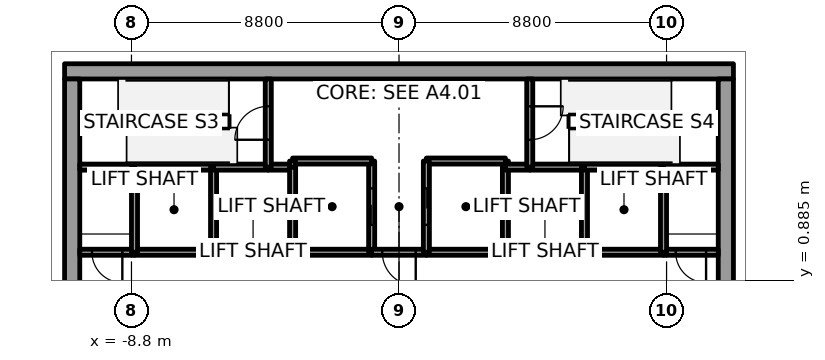
"""IFC4 building model, lengths in metres.
Left out: names, types, materials, properties, quantities, classifications, styles, units other than length and angle.
Written with IfcOpenShell. Run it as: python <this file> out.ifc"""

import sys

from ifc_helpers import new_model, si_unit, direction, frame, frame_2d, origin, place, context, subcontext, project, spatial, rectangle, extrude, element, fill, save


model = new_model("IFC4")
c1 = context("Model", 3, precision=1e-05, world=origin(), true_north=direction((0.0, 1.0)))
c2 = subcontext(c1, "Body", "Model", "MODEL_VIEW")
j1 = project(units=[si_unit("LENGTHUNIT", "METRE"), si_unit("PLANEANGLEUNIT", "RADIAN")], contexts=[c1])
p1 = place(None, origin())
s1 = spatial("IfcSite", under=j1, at=p1, CompositionType="ELEMENT")
p2 = place(p1, origin())
s2 = spatial("IfcBuilding", under=s1, at=p2, CompositionType="ELEMENT")
p3 = place(p2, frame((0.0, 0.0, -4.5)))
s3 = spatial("IfcBuildingStorey", under=s2, at=p3, CompositionType="ELEMENT", Elevation=-4.5)
p4 = place(p3, frame((-11.0, 7.75, 0.0), z_axis=(0.0, 0.0, 1.0), x_axis=(1.0, 0.0, 0.0)))
e1 = element("IfcWall", 1, at=p4, inside=s3, PredefinedType="SHEAR", context=c2, shape_type="SweptSolid", body=[
    extrude(rectangle(XDim=22.0, YDim=0.5, at=frame_2d((11.0, 0.0))), origin(), (0.0, 0.0, 1.0), 4.5),
])
for number, where, z_axis, x_axis in (
    (2, (-10.75, -7.5, 0.0), (0.0, 0.0, 1.0), (0.0, 1.0, 0.0)),
    (3, (10.75, -7.5, 0.0), (0.0, 0.0, 1.0), (0.0, 1.0, 0.0)),
):
    element("IfcWall", number, at=place(p3, frame(where, z_axis=z_axis, x_axis=x_axis)), inside=s3, PredefinedType="SHEAR", context=c2, shape_type="SweptSolid", body=[
        extrude(rectangle(XDim=15.0, YDim=0.5, at=frame_2d((7.5, 0.0))), origin(), (0.0, 0.0, 1.0), 4.5),
    ])
p5 = place(p3, frame((-8.7, 1.8, 0.0), z_axis=(0.0, 0.0, 1.0), x_axis=(-1.0, 0.0, 0.0)))
e4 = element("IfcWall", 4, at=p5, inside=s3, PredefinedType="SOLIDWALL", context=c2, shape_type="SweptSolid", body=[
    extrude(rectangle(XDim=1.8, YDim=0.2, at=frame_2d((0.9, 0.0))), origin(), (0.0, 0.0, 1.0), 4.25),
])
p6 = place(p5, frame((0.4, 0.0, 0.0)))
e5 = element("IfcOpeningElement", 5, at=p6, cuts=e4, PredefinedType="OPENING", context=c2, shape_type="SweptSolid", body=[
    extrude(rectangle(XDim=1.0, YDim=2.4, at=frame_2d((0.5, 1.2))), frame((0.0, 0.1, 0.0), z_axis=(0.0, -1.0, 0.0), x_axis=(1.0, 0.0, 0.0)), (0.0, 0.0, 1.0), 0.2),
])
p7 = place(p3, frame((-8.7, 4.6, 0.0), z_axis=(0.0, 0.0, 1.0), x_axis=(-1.0, 0.0, 0.0)))
e6 = element("IfcWall", 6, at=p7, inside=s3, PredefinedType="SOLIDWALL", context=c2, shape_type="SweptSolid", body=[
    extrude(rectangle(XDim=1.8, YDim=0.2, at=frame_2d((0.9, 0.0))), origin(), (0.0, 0.0, 1.0), 4.25),
])
p8 = place(p3, frame((-6.1, 1.8, 0.0), z_axis=(0.0, 0.0, 1.0), x_axis=(-1.0, 0.0, 0.0)))
e7 = element("IfcWall", 7, at=p8, inside=s3, PredefinedType="SOLIDWALL", context=c2, shape_type="SweptSolid", body=[
    extrude(rectangle(XDim=2.6, YDim=0.2, at=frame_2d((1.3, 0.0))), origin(), (0.0, 0.0, 1.0), 4.25),
])
p9 = place(p3, frame((-8.7, 1.8, 0.0), z_axis=(0.0, 0.0, 1.0), x_axis=(0.0, 1.0, 0.0)))
e8 = element("IfcWall", 8, at=p9, inside=s3, PredefinedType="SOLIDWALL", context=c2, shape_type="SweptSolid", body=[
    extrude(rectangle(XDim=2.8, YDim=0.2, at=frame_2d((1.4, 0.0))), origin(), (0.0, 0.0, 1.0), 4.25),
])
p10 = place(p3, frame((-6.1, 4.6, 0.0), z_axis=(0.0, 0.0, 1.0), x_axis=(-1.0, 0.0, 0.0)))
e9 = element("IfcWall", 9, at=p10, inside=s3, PredefinedType="SOLIDWALL", context=c2, shape_type="SweptSolid", body=[
    extrude(rectangle(XDim=2.6, YDim=0.2, at=frame_2d((1.3, 0.0))), origin(), (0.0, 0.0, 1.0), 4.25),
])
p11 = place(p3, frame((-3.5, 1.8, 0.0), z_axis=(0.0, 0.0, 1.0), x_axis=(-1.0, 0.0, 0.0)))
e10 = element("IfcWall", 10, at=p11, inside=s3, PredefinedType="SOLIDWALL", context=c2, shape_type="SweptSolid", body=[
    extrude(rectangle(XDim=2.6, YDim=0.2, at=frame_2d((1.3, 0.0))), origin(), (0.0, 0.0, 1.0), 4.25),
])
p12 = place(p3, frame((-6.1, 1.8, 0.0), z_axis=(0.0, 0.0, 1.0), x_axis=(0.0, 1.0, 0.0)))
e11 = element("IfcWall", 11, at=p12, inside=s3, PredefinedType="SOLIDWALL", context=c2, shape_type="SweptSolid", body=[
    extrude(rectangle(XDim=2.8, YDim=0.2, at=frame_2d((1.4, 0.0))), origin(), (0.0, 0.0, 1.0), 4.25),
])
p13 = place(p3, frame((-4.3, 4.6, 0.0), z_axis=(0.0, 0.0, 1.0), x_axis=(-1.0, 0.0, 0.0)))
e12 = element("IfcWall", 12, at=p13, inside=s3, PredefinedType="SOLIDWALL", context=c2, shape_type="SweptSolid", body=[
    extrude(rectangle(XDim=1.8, YDim=0.2, at=frame_2d((0.9, 0.0))), origin(), (0.0, 0.0, 1.0), 4.25),
])
p14 = place(p3, frame((-3.5, 4.6, 0.0), z_axis=(0.0, 0.0, 1.0), x_axis=(-1.0, 0.0, 0.0)))
e13 = element("IfcWall", 13, at=p14, inside=s3, PredefinedType="SOLIDWALL", context=c2, shape_type="SweptSolid", body=[
    extrude(rectangle(XDim=0.8, YDim=0.2, at=frame_2d((0.4, 0.0))), origin(), (0.0, 0.0, 1.0), 4.25),
])
p15 = place(p3, frame((-4.3, 4.6, 0.0), z_axis=(0.0, 0.0, 1.0), x_axis=(0.0, 1.0, 0.0)))
e14 = element("IfcWall", 14, at=p15, inside=s3, PredefinedType="SOLIDWALL", context=c2, shape_type="SweptSolid", body=[
    extrude(rectangle(XDim=2.9, YDim=0.2, at=frame_2d((1.45, 0.0))), origin(), (0.0, 0.0, 1.0), 4.25),
])
p16 = place(p15, frame((0.9, 0.0, 0.0)))
e15 = element("IfcOpeningElement", 15, at=p16, cuts=e14, PredefinedType="OPENING", context=c2, shape_type="SweptSolid", body=[
    extrude(rectangle(XDim=1.1, YDim=2.4, at=frame_2d((0.55, 1.2))), frame((0.0, 0.1, 0.0), z_axis=(0.0, -1.0, 0.0), x_axis=(1.0, 0.0, 0.0)), (0.0, 0.0, 1.0), 0.2),
])
p17 = place(p3, frame((-0.9, 1.8, 0.0), z_axis=(0.0, 0.0, 1.0), x_axis=(-1.0, 0.0, 0.0)))
e16 = element("IfcWall", 16, at=p17, inside=s3, PredefinedType="SOLIDWALL", context=c2, shape_type="SweptSolid", body=[
    extrude(rectangle(XDim=2.6, YDim=0.2, at=frame_2d((1.3, 0.0))), origin(), (0.0, 0.0, 1.0), 4.25),
])
p18 = place(p3, frame((-3.5, 4.6, 0.0), z_axis=(0.0, 0.0, 1.0), x_axis=(0.0, -1.0, 0.0)))
e17 = element("IfcWall", 17, at=p18, inside=s3, PredefinedType="SOLIDWALL", context=c2, shape_type="SweptSolid", body=[
    extrude(rectangle(XDim=2.8, YDim=0.2, at=frame_2d((1.4, 0.0))), origin(), (0.0, 0.0, 1.0), 4.25),
])
p19 = place(p3, frame((-0.9, 1.8, 0.0), z_axis=(0.0, 0.0, 1.0), x_axis=(0.0, 1.0, 0.0)))
e18 = element("IfcWall", 18, at=p19, inside=s3, PredefinedType="SOLIDWALL", context=c2, shape_type="SweptSolid", body=[
    extrude(rectangle(XDim=3.0, YDim=0.2, at=frame_2d((1.5, 0.0))), origin(), (0.0, 0.0, 1.0), 4.25),
])
p20 = place(p19, frame((0.9, 0.0, 0.0)))
e19 = element("IfcOpeningElement", 19, at=p20, cuts=e18, PredefinedType="OPENING", context=c2, shape_type="SweptSolid", body=[
    extrude(rectangle(XDim=1.2, YDim=2.1, at=frame_2d((0.6, 1.05))), frame((0.0, 0.1, 0.0), z_axis=(0.0, -1.0, 0.0), x_axis=(1.0, 0.0, 0.0)), (0.0, 0.0, 1.0), 0.2),
])
p21 = place(p3, frame((-0.9, 4.8, 0.0), z_axis=(0.0, 0.0, 1.0), x_axis=(-1.0, 0.0, 0.0)))
e20 = element("IfcWall", 20, at=p21, inside=s3, PredefinedType="SOLIDWALL", context=c2, shape_type="SweptSolid", body=[
    extrude(rectangle(XDim=2.6, YDim=0.2, at=frame_2d((1.3, 0.0))), origin(), (0.0, 0.0, 1.0), 4.25),
])
p22 = place(p3, frame((-3.5, 4.8, 0.0), z_axis=(0.0, 0.0, 1.0), x_axis=(0.0, -1.0, 0.0)))
e21 = element("IfcWall", 21, at=p22, inside=s3, PredefinedType="SOLIDWALL", context=c2, shape_type="SweptSolid", body=[
    extrude(rectangle(XDim=0.2, YDim=0.2, at=frame_2d((0.1, 0.0))), origin(), (0.0, 0.0, 1.0), 4.25),
])
p23 = place(p3, frame((0.9, 1.8, 0.0), z_axis=(0.0, 0.0, 1.0), x_axis=(-1.0, 0.0, 0.0)))
e22 = element("IfcWall", 22, at=p23, inside=s3, PredefinedType="SOLIDWALL", context=c2, shape_type="SweptSolid", body=[
    extrude(rectangle(XDim=1.8, YDim=0.2, at=frame_2d((0.9, 0.0))), origin(), (0.0, 0.0, 1.0), 4.25),
])
p24 = place(p23, frame((0.35, 0.0, 0.0)))
e23 = element("IfcOpeningElement", 23, at=p24, cuts=e22, PredefinedType="OPENING", context=c2, shape_type="SweptSolid", body=[
    extrude(rectangle(XDim=1.1, YDim=2.4, at=frame_2d((0.55, 1.2))), frame((0.0, 0.1, 0.0), z_axis=(0.0, -1.0, 0.0), x_axis=(1.0, 0.0, 0.0)), (0.0, 0.0, 1.0), 0.2),
])
p25 = place(p3, frame((3.5, 1.8, 0.0), z_axis=(0.0, 0.0, 1.0), x_axis=(-1.0, 0.0, 0.0)))
e24 = element("IfcWall", 24, at=p25, inside=s3, PredefinedType="SOLIDWALL", context=c2, shape_type="SweptSolid", body=[
    extrude(rectangle(XDim=2.6, YDim=0.2, at=frame_2d((1.3, 0.0))), origin(), (0.0, 0.0, 1.0), 4.25),
])
p26 = place(p3, frame((3.5, 4.6, 0.0), z_axis=(0.0, 0.0, 1.0), x_axis=(0.0, 1.0, 0.0)))
e25 = element("IfcWall", 25, at=p26, inside=s3, PredefinedType="SOLIDWALL", context=c2, shape_type="SweptSolid", body=[
    extrude(rectangle(XDim=0.2, YDim=0.2, at=frame_2d((0.1, 0.0))), origin(), (0.0, 0.0, 1.0), 4.25),
])
p27 = place(p3, frame((3.5, 4.8, 0.0), z_axis=(0.0, 0.0, 1.0), x_axis=(-1.0, 0.0, 0.0)))
e26 = element("IfcWall", 26, at=p27, inside=s3, PredefinedType="SOLIDWALL", context=c2, shape_type="SweptSolid", body=[
    extrude(rectangle(XDim=2.6, YDim=0.2, at=frame_2d((1.3, 0.0))), origin(), (0.0, 0.0, 1.0), 4.25),
])
p28 = place(p3, frame((0.9, 4.8, 0.0), z_axis=(0.0, 0.0, 1.0), x_axis=(0.0, -1.0, 0.0)))
e27 = element("IfcWall", 27, at=p28, inside=s3, PredefinedType="SOLIDWALL", context=c2, shape_type="SweptSolid", body=[
    extrude(rectangle(XDim=3.0, YDim=0.2, at=frame_2d((1.5, 0.0))), origin(), (0.0, 0.0, 1.0), 4.25),
])
p29 = place(p28, frame((0.9, 0.0, 0.0)))
e28 = element("IfcOpeningElement", 28, at=p29, cuts=e27, PredefinedType="OPENING", context=c2, shape_type="SweptSolid", body=[
    extrude(rectangle(XDim=1.2, YDim=2.1, at=frame_2d((0.6, 1.05))), frame((0.0, 0.1, 0.0), z_axis=(0.0, -1.0, 0.0), x_axis=(1.0, 0.0, 0.0)), (0.0, 0.0, 1.0), 0.2),
])
p30 = place(p3, frame((6.1, 1.8, 0.0), z_axis=(0.0, 0.0, 1.0), x_axis=(-1.0, 0.0, 0.0)))
e29 = element("IfcWall", 29, at=p30, inside=s3, PredefinedType="SOLIDWALL", context=c2, shape_type="SweptSolid", body=[
    extrude(rectangle(XDim=2.6, YDim=0.2, at=frame_2d((1.3, 0.0))), origin(), (0.0, 0.0, 1.0), 4.25),
])
p31 = place(p3, frame((3.5, 1.8, 0.0), z_axis=(0.0, 0.0, 1.0), x_axis=(0.0, 1.0, 0.0)))
e30 = element("IfcWall", 30, at=p31, inside=s3, PredefinedType="SOLIDWALL", context=c2, shape_type="SweptSolid", body=[
    extrude(rectangle(XDim=2.8, YDim=0.2, at=frame_2d((1.4, 0.0))), origin(), (0.0, 0.0, 1.0), 4.25),
])
p32 = place(p3, frame((4.3, 4.6, 0.0), z_axis=(0.0, 0.0, 1.0), x_axis=(-1.0, 0.0, 0.0)))
e31 = element("IfcWall", 31, at=p32, inside=s3, PredefinedType="SOLIDWALL", context=c2, shape_type="SweptSolid", body=[
    extrude(rectangle(XDim=0.8, YDim=0.2, at=frame_2d((0.4, 0.0))), origin(), (0.0, 0.0, 1.0), 4.25),
])
p33 = place(p3, frame((6.1, 4.6, 0.0), z_axis=(0.0, 0.0, 1.0), x_axis=(-1.0, 0.0, 0.0)))
e32 = element("IfcWall", 32, at=p33, inside=s3, PredefinedType="SOLIDWALL", context=c2, shape_type="SweptSolid", body=[
    extrude(rectangle(XDim=1.8, YDim=0.2, at=frame_2d((0.9, 0.0))), origin(), (0.0, 0.0, 1.0), 4.25),
])
p34 = place(p3, frame((4.3, 7.5, 0.0), z_axis=(0.0, 0.0, 1.0), x_axis=(0.0, -1.0, 0.0)))
e33 = element("IfcWall", 33, at=p34, inside=s3, PredefinedType="SOLIDWALL", context=c2, shape_type="SweptSolid", body=[
    extrude(rectangle(XDim=2.9, YDim=0.2, at=frame_2d((1.45, 0.0))), origin(), (0.0, 0.0, 1.0), 4.25),
])
p35 = place(p34, frame((0.9, 0.0, 0.0)))
e34 = element("IfcOpeningElement", 34, at=p35, cuts=e33, PredefinedType="OPENING", context=c2, shape_type="SweptSolid", body=[
    extrude(rectangle(XDim=1.1, YDim=2.4, at=frame_2d((0.55, 1.2))), frame((0.0, 0.1, 0.0), z_axis=(0.0, -1.0, 0.0), x_axis=(1.0, 0.0, 0.0)), (0.0, 0.0, 1.0), 0.2),
])
p36 = place(p3, frame((8.7, 1.8, 0.0), z_axis=(0.0, 0.0, 1.0), x_axis=(-1.0, 0.0, 0.0)))
e35 = element("IfcWall", 35, at=p36, inside=s3, PredefinedType="SOLIDWALL", context=c2, shape_type="SweptSolid", body=[
    extrude(rectangle(XDim=2.6, YDim=0.2, at=frame_2d((1.3, 0.0))), origin(), (0.0, 0.0, 1.0), 4.25),
])
p37 = place(p3, frame((6.1, 1.8, 0.0), z_axis=(0.0, 0.0, 1.0), x_axis=(0.0, 1.0, 0.0)))
e36 = element("IfcWall", 36, at=p37, inside=s3, PredefinedType="SOLIDWALL", context=c2, shape_type="SweptSolid", body=[
    extrude(rectangle(XDim=2.8, YDim=0.2, at=frame_2d((1.4, 0.0))), origin(), (0.0, 0.0, 1.0), 4.25),
])
p38 = place(p3, frame((8.7, 4.6, 0.0), z_axis=(0.0, 0.0, 1.0), x_axis=(-1.0, 0.0, 0.0)))
e37 = element("IfcWall", 37, at=p38, inside=s3, PredefinedType="SOLIDWALL", context=c2, shape_type="SweptSolid", body=[
    extrude(rectangle(XDim=2.6, YDim=0.2, at=frame_2d((1.3, 0.0))), origin(), (0.0, 0.0, 1.0), 4.25),
])
p39 = place(p3, frame((10.5, 1.8, 0.0), z_axis=(0.0, 0.0, 1.0), x_axis=(-1.0, 0.0, 0.0)))
e38 = element("IfcWall", 38, at=p39, inside=s3, PredefinedType="SOLIDWALL", context=c2, shape_type="SweptSolid", body=[
    extrude(rectangle(XDim=1.8, YDim=0.2, at=frame_2d((0.9, 0.0))), origin(), (0.0, 0.0, 1.0), 4.25),
])
p40 = place(p39, frame((0.4, 0.0, 0.0)))
e39 = element("IfcOpeningElement", 39, at=p40, cuts=e38, PredefinedType="OPENING", context=c2, shape_type="SweptSolid", body=[
    extrude(rectangle(XDim=1.0, YDim=2.4, at=frame_2d((0.5, 1.2))), frame((0.0, 0.1, 0.0), z_axis=(0.0, -1.0, 0.0), x_axis=(1.0, 0.0, 0.0)), (0.0, 0.0, 1.0), 0.2),
])
p41 = place(p3, frame((8.7, 4.6, 0.0), z_axis=(0.0, 0.0, 1.0), x_axis=(0.0, -1.0, 0.0)))
e40 = element("IfcWall", 40, at=p41, inside=s3, PredefinedType="SOLIDWALL", context=c2, shape_type="SweptSolid", body=[
    extrude(rectangle(XDim=2.8, YDim=0.2, at=frame_2d((1.4, 0.0))), origin(), (0.0, 0.0, 1.0), 4.25),
])
p42 = place(p3, frame((10.5, 4.6, 0.0), z_axis=(0.0, 0.0, 1.0), x_axis=(-1.0, 0.0, 0.0)))
e41 = element("IfcWall", 41, at=p42, inside=s3, PredefinedType="SOLIDWALL", context=c2, shape_type="SweptSolid", body=[
    extrude(rectangle(XDim=1.8, YDim=0.2, at=frame_2d((0.9, 0.0))), origin(), (0.0, 0.0, 1.0), 4.25),
])
p43 = place(p20, origin())
e42 = element("IfcDoor", 42, at=p43, inside=s3, OperationType="SLIDING_TO_LEFT", PredefinedType="DOOR", context=c2, shape_type="SweptSolid", body=[
    extrude(rectangle(XDim=1.2, YDim=2.1, at=frame_2d((0.6, 1.05))), frame((0.0, 0.025, 0.0), z_axis=(0.0, -1.0, 0.0), x_axis=(1.0, 0.0, 0.0)), (0.0, 0.0, 1.0), 0.05),
])
fill(e19, e42)
p44 = place(p29, origin())
e43 = element("IfcDoor", 43, at=p44, inside=s3, OperationType="SLIDING_TO_RIGHT", PredefinedType="DOOR", context=c2, shape_type="SweptSolid", body=[
    extrude(rectangle(XDim=1.2, YDim=2.1, at=frame_2d((0.6, 1.05))), frame((0.0, 0.025, 0.0), z_axis=(0.0, -1.0, 0.0), x_axis=(1.0, 0.0, 0.0)), (0.0, 0.0, 1.0), 0.05),
])
fill(e28, e43)
p45 = place(p24, origin())
e44 = element("IfcDoor", 44, at=p45, inside=s3, OperationType="SINGLE_SWING_RIGHT", PredefinedType="DOOR", context=c2, shape_type="SweptSolid", body=[
    extrude(rectangle(XDim=1.1, YDim=2.4, at=frame_2d((0.55, 1.2))), frame((0.0, 0.025, 0.0), z_axis=(0.0, -1.0, 0.0), x_axis=(1.0, 0.0, 0.0)), (0.0, 0.0, 1.0), 0.05),
])
fill(e23, e44)
p46 = place(p6, origin())
e45 = element("IfcDoor", 45, at=p46, inside=s3, OperationType="SINGLE_SWING_RIGHT", PredefinedType="DOOR", context=c2, shape_type="SweptSolid", body=[
    extrude(rectangle(XDim=1.0, YDim=2.4, at=frame_2d((0.5, 1.2))), frame((0.0, 0.025, 0.0), z_axis=(0.0, -1.0, 0.0), x_axis=(1.0, 0.0, 0.0)), (0.0, 0.0, 1.0), 0.05),
])
fill(e5, e45)
p47 = place(p40, origin())
e46 = element("IfcDoor", 46, at=p47, inside=s3, OperationType="SINGLE_SWING_LEFT", PredefinedType="DOOR", context=c2, shape_type="SweptSolid", body=[
    extrude(rectangle(XDim=1.0, YDim=2.4, at=frame_2d((0.5, 1.2))), frame((0.0, 0.025, 0.0), z_axis=(0.0, -1.0, 0.0), x_axis=(1.0, 0.0, 0.0)), (0.0, 0.0, 1.0), 0.05),
])
fill(e39, e46)
p48 = place(p16, origin())
e47 = element("IfcDoor", 47, at=p48, inside=s3, OperationType="SINGLE_SWING_RIGHT", PredefinedType="DOOR", context=c2, shape_type="SweptSolid", body=[
    extrude(rectangle(XDim=1.1, YDim=2.4, at=frame_2d((0.55, 1.2))), frame((0.0, 0.025, 0.0), z_axis=(0.0, -1.0, 0.0), x_axis=(1.0, 0.0, 0.0)), (0.0, 0.0, 1.0), 0.05),
])
fill(e15, e47)
p49 = place(p35, origin())
e48 = element("IfcDoor", 48, at=p49, inside=s3, OperationType="SINGLE_SWING_RIGHT", PredefinedType="DOOR", context=c2, shape_type="SweptSolid", body=[
    extrude(rectangle(XDim=1.1, YDim=2.4, at=frame_2d((0.55, 1.2))), frame((0.0, 0.025, 0.0), z_axis=(0.0, -1.0, 0.0), x_axis=(1.0, 0.0, 0.0)), (0.0, 0.0, 1.0), 0.05),
])
fill(e34, e48)
save(model, sys.argv[1])
